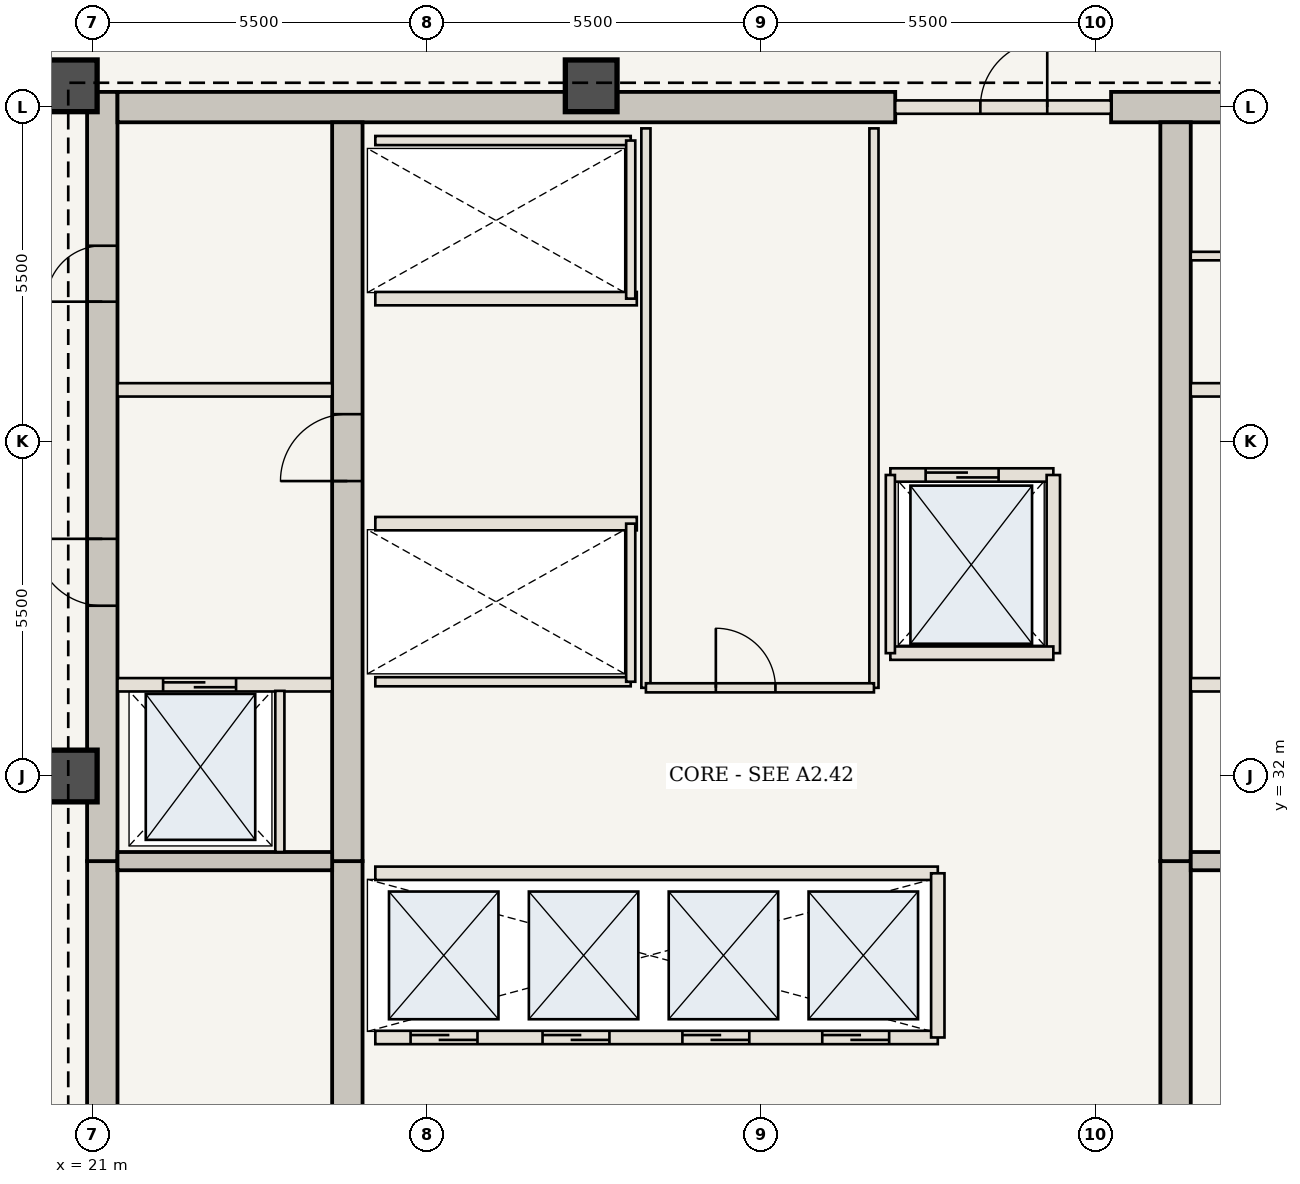
"""IFC4 building model, lengths in metres.
Left out: names, types, materials, properties, quantities, classifications, styles, units other than length and angle.
Written with IfcOpenShell. Run it as: python <this file> out.ifc"""

import sys

from ifc_helpers import new_model, si_unit, direction, frame, frame_2d, origin, origin_2d, place, context, subcontext, project, spatial, rectangle, extrude, element, fill, save


model = new_model("IFC4")
c1 = context("Model", 3, precision=1e-05, world=origin(), true_north=direction((0.0, 1.0)))
c2 = subcontext(c1, "Body", "Model", "MODEL_VIEW")
j1 = project(units=[si_unit("LENGTHUNIT", "METRE"), si_unit("PLANEANGLEUNIT", "RADIAN")], contexts=[c1])
p1 = place(None, origin())
s1 = spatial("IfcSite", under=j1, at=p1, CompositionType="ELEMENT")
p2 = place(p1, origin())
s2 = spatial("IfcBuilding", under=s1, at=p2, CompositionType="ELEMENT")
p3 = place(p2, frame((0.0, 0.0, 190.75)))
s3 = spatial("IfcBuildingStorey", under=s2, at=p3, CompositionType="ELEMENT", Elevation=190.75)
p4 = place(p3, frame((21.16, 20.7, 0.0), z_axis=(0.0, 0.0, 1.0), x_axis=(0.0, 1.0, 0.0)))
e1 = element("IfcWall", 1, at=p4, inside=s3, PredefinedType="SHEAR", context=c2, shape_type="SweptSolid", body=[
    extrude(rectangle(XDim=9.9, YDim=0.5, at=frame_2d((4.95, 0.0))), origin(), (0.0, 0.0, 1.0), 3.85),
])
p5 = place(p4, frame((1.05, 0.0, 0.0)))
e2 = element("IfcOpeningElement", 2, at=p5, cuts=e1, PredefinedType="OPENING", context=c2, shape_type="SweptSolid", body=[
    extrude(rectangle(XDim=1.15, YDim=2.15, at=frame_2d((0.575, 1.075))), frame((0.0, 0.26, 0.0), z_axis=(0.0, -1.0, 0.0), x_axis=(1.0, 0.0, 0.0)), (0.0, 0.0, 1.0), 0.52),
])
p6 = place(p3, frame((21.16, 30.6, 0.0), z_axis=(0.0, 0.0, 1.0), x_axis=(0.0, 1.0, 0.0)))
e3 = element("IfcWall", 3, at=p6, inside=s3, PredefinedType="SHEAR", context=c2, shape_type="SweptSolid", body=[
    extrude(rectangle(XDim=12.65, YDim=0.5, at=frame_2d((6.325, 0.0))), origin(), (0.0, 0.0, 1.0), 3.85),
])
p7 = place(p6, frame((4.2, 0.0, 0.0)))
e4 = element("IfcOpeningElement", 4, at=p7, cuts=e3, PredefinedType="OPENING", context=c2, shape_type="SweptSolid", body=[
    extrude(rectangle(XDim=1.1, YDim=2.15, at=frame_2d((0.55, 1.075))), frame((0.0, 0.26, 0.0), z_axis=(0.0, -1.0, 0.0), x_axis=(1.0, 0.0, 0.0)), (0.0, 0.0, 1.0), 0.52),
])
p8 = place(p6, frame((9.2, 0.0, 0.0)))
e5 = element("IfcOpeningElement", 5, at=p8, cuts=e3, PredefinedType="OPENING", context=c2, shape_type="SweptSolid", body=[
    extrude(rectangle(XDim=0.92, YDim=2.1, at=frame_2d((0.46, 1.05))), frame((0.0, 0.26, 0.0), z_axis=(0.0, -1.0, 0.0), x_axis=(1.0, 0.0, 0.0)), (0.0, 0.0, 1.0), 0.52),
])
p9 = place(p3, frame((21.41, 43.0, 0.0), z_axis=(0.0, 0.0, 1.0), x_axis=(1.0, 0.0, 0.0)))
e6 = element("IfcWall", 6, at=p9, inside=s3, PredefinedType="SHEAR", context=c2, shape_type="SweptSolid", body=[
    extrude(rectangle(XDim=12.79, YDim=0.5, at=frame_2d((6.395, 0.0))), origin(), (0.0, 0.0, 1.0), 3.85),
])
p10 = place(p3, frame((37.75, 43.0, 0.0), z_axis=(0.0, 0.0, 1.0), x_axis=(1.0, 0.0, 0.0)))
e7 = element("IfcWall", 7, at=p10, inside=s3, PredefinedType="SHEAR", context=c2, shape_type="SweptSolid", body=[
    extrude(rectangle(XDim=4.84, YDim=0.5, at=frame_2d((2.42, 0.0))), origin(), (0.0, 0.0, 1.0), 3.85),
])
p11 = place(p3, frame((25.19, 21.2, 0.0), z_axis=(0.0, 0.0, 1.0), x_axis=(0.0, 1.0, 0.0)))
e8 = element("IfcWall", 8, at=p11, inside=s3, PredefinedType="SHEAR", context=c2, shape_type="SweptSolid", body=[
    extrude(rectangle(XDim=9.4, YDim=0.5, at=frame_2d((4.7, 0.0))), origin(), (0.0, 0.0, 1.0), 3.85),
])
p12 = place(p3, frame((25.19, 30.6, 0.0), z_axis=(0.0, 0.0, 1.0), x_axis=(0.0, 1.0, 0.0)))
e9 = element("IfcWall", 9, at=p12, inside=s3, PredefinedType="SHEAR", context=c2, shape_type="SweptSolid", body=[
    extrude(rectangle(XDim=12.15, YDim=0.5, at=frame_2d((6.075, 0.0))), origin(), (0.0, 0.0, 1.0), 3.85),
])
p13 = place(p12, frame((6.25, 0.0, 0.0)))
e10 = element("IfcOpeningElement", 10, at=p13, cuts=e9, PredefinedType="OPENING", context=c2, shape_type="SweptSolid", body=[
    extrude(rectangle(XDim=1.1, YDim=2.15, at=frame_2d((0.55, 1.075))), frame((0.0, 0.26, 0.0), z_axis=(0.0, -1.0, 0.0), x_axis=(1.0, 0.0, 0.0)), (0.0, 0.0, 1.0), 0.52),
])
p14 = place(p3, frame((38.81, 21.2, 0.0), z_axis=(0.0, 0.0, 1.0), x_axis=(0.0, 1.0, 0.0)))
e11 = element("IfcWall", 11, at=p14, inside=s3, PredefinedType="SHEAR", context=c2, shape_type="SweptSolid", body=[
    extrude(rectangle(XDim=9.4, YDim=0.5, at=frame_2d((4.7, 0.0))), origin(), (0.0, 0.0, 1.0), 3.85),
])
p15 = place(p3, frame((38.81, 30.6, 0.0), z_axis=(0.0, 0.0, 1.0), x_axis=(0.0, 1.0, 0.0)))
e12 = element("IfcWall", 12, at=p15, inside=s3, PredefinedType="SHEAR", context=c2, shape_type="SweptSolid", body=[
    extrude(rectangle(XDim=12.15, YDim=0.5, at=frame_2d((6.075, 0.0))), origin(), (0.0, 0.0, 1.0), 3.85),
])
for number, where, z_axis, x_axis in (
    (13, (29.2, 43.35, 0.0), (0.0, 0.0, 1.0), (1.0, 0.0, 0.0)),
    (14, (20.65, 43.35, 0.0), (0.0, 0.0, 1.0), (1.0, 0.0, 0.0)),
    (15, (20.65, 32.0, 0.0), (0.0, 0.0, 1.0), (1.0, 0.0, 0.0)),
):
    element("IfcColumn", number, at=place(p3, frame(where, z_axis=z_axis, x_axis=x_axis)), inside=s3, PredefinedType="COLUMN", context=c2, shape_type="SweptSolid", body=[
        extrude(rectangle(XDim=0.85, YDim=0.85, at=origin_2d()), origin(), (0.0, 0.0, 1.0), 3.85),
    ])
for number, where, z_axis, x_axis in (
    (16, (21.41, 30.6, 0.0), (0.0, 0.0, 1.0), (1.0, 0.0, 0.0)),
    (17, (39.06, 30.6, 0.0), (0.0, 0.0, 1.0), (1.0, 0.0, 0.0)),
):
    element("IfcWall", number, at=place(p3, frame(where, z_axis=z_axis, x_axis=x_axis)), inside=s3, PredefinedType="SHEAR", context=c2, shape_type="SweptSolid", body=[
        extrude(rectangle(XDim=3.53, YDim=0.3, at=frame_2d((1.765, 0.0))), origin(), (0.0, 0.0, 1.0), 3.685),
    ])
p16 = place(p3, frame((21.41, 33.5, 0.0), z_axis=(0.0, 0.0, 1.0), x_axis=(1.0, 0.0, 0.0)))
e18 = element("IfcWall", 18, at=p16, inside=s3, PredefinedType="STANDARD", context=c2, shape_type="SweptSolid", body=[
    extrude(rectangle(XDim=3.53, YDim=0.22, at=frame_2d((1.765, 0.0))), origin(), (0.0, 0.0, 1.0), 3.685),
])
p17 = place(p16, frame((0.75, 0.0, 0.0)))
e19 = element("IfcOpeningElement", 19, at=p17, cuts=e18, PredefinedType="OPENING", context=c2, shape_type="SweptSolid", body=[
    extrude(rectangle(XDim=1.2, YDim=2.2, at=frame_2d((0.6, 1.1))), frame((0.0, 0.12, 0.0), z_axis=(0.0, -1.0, 0.0), x_axis=(1.0, 0.0, 0.0)), (0.0, 0.0, 1.0), 0.24),
])
p18 = place(p3, frame((24.08, 30.75, 0.0), z_axis=(0.0, 0.0, 1.0), x_axis=(0.0, 1.0, 0.0)))
e20 = element("IfcWall", 20, at=p18, inside=s3, PredefinedType="STANDARD", context=c2, shape_type="SweptSolid", body=[
    extrude(rectangle(XDim=2.65, YDim=0.15, at=frame_2d((1.325, 0.0))), origin(), (0.0, 0.0, 1.0), 3.685),
])
p19 = place(p3, frame((39.06, 33.5, 0.0), z_axis=(0.0, 0.0, 1.0), x_axis=(1.0, 0.0, 0.0)))
e21 = element("IfcWall", 21, at=p19, inside=s3, PredefinedType="STANDARD", context=c2, shape_type="SweptSolid", body=[
    extrude(rectangle(XDim=3.53, YDim=0.22, at=frame_2d((1.765, 0.0))), origin(), (0.0, 0.0, 1.0), 3.685),
])
p20 = place(p19, frame((1.55, 0.0, 0.0)))
e22 = element("IfcOpeningElement", 22, at=p20, cuts=e21, PredefinedType="OPENING", context=c2, shape_type="SweptSolid", body=[
    extrude(rectangle(XDim=1.2, YDim=2.2, at=frame_2d((0.6, 1.1))), frame((0.0, 0.12, 0.0), z_axis=(0.0, -1.0, 0.0), x_axis=(1.0, 0.0, 0.0)), (0.0, 0.0, 1.0), 0.24),
])
for number, where, z_axis, x_axis in (
    (23, (21.41, 38.35, 0.0), (0.0, 0.0, 1.0), (1.0, 0.0, 0.0)),
    (24, (39.06, 38.35, 0.0), (0.0, 0.0, 1.0), (1.0, 0.0, 0.0)),
):
    element("IfcWall", number, at=place(p3, frame(where, z_axis=z_axis, x_axis=x_axis)), inside=s3, PredefinedType="STANDARD", context=c2, shape_type="SweptSolid", body=[
        extrude(rectangle(XDim=3.53, YDim=0.22, at=frame_2d((1.765, 0.0))), origin(), (0.0, 0.0, 1.0), 3.685),
    ])
p21 = place(p3, frame((39.06, 40.55, 0.0), z_axis=(0.0, 0.0, 1.0), x_axis=(1.0, 0.0, 0.0)))
e25 = element("IfcWall", 25, at=p21, inside=s3, PredefinedType="STANDARD", context=c2, shape_type="SweptSolid", body=[
    extrude(rectangle(XDim=3.53, YDim=0.14, at=frame_2d((1.765, 0.0))), origin(), (0.0, 0.0, 1.0), 3.685),
])
p22 = place(p3, frame((25.65, 27.7, 0.0), z_axis=(0.0, 0.0, 1.0), x_axis=(1.0, 0.0, 0.0)))
e26 = element("IfcWall", 26, at=p22, inside=s3, PredefinedType="STANDARD", context=c2, shape_type="SweptSolid", body=[
    extrude(rectangle(XDim=9.25, YDim=0.22, at=frame_2d((4.625, 0.0))), origin(), (0.0, 0.0, 1.0), 3.685),
])
p23 = place(p22, frame((0.58, 0.0, 0.0)))
e27 = element("IfcOpeningElement", 27, at=p23, cuts=e26, PredefinedType="OPENING", context=c2, shape_type="SweptSolid", body=[
    extrude(rectangle(XDim=1.1, YDim=2.15, at=frame_2d((0.55, 1.075))), frame((0.0, 0.12, 0.0), z_axis=(0.0, -1.0, 0.0), x_axis=(1.0, 0.0, 0.0)), (0.0, 0.0, 1.0), 0.24),
])
p24 = place(p22, frame((2.75, 0.0, 0.0)))
e28 = element("IfcOpeningElement", 28, at=p24, cuts=e26, PredefinedType="OPENING", context=c2, shape_type="SweptSolid", body=[
    extrude(rectangle(XDim=1.1, YDim=2.15, at=frame_2d((0.55, 1.075))), frame((0.0, 0.12, 0.0), z_axis=(0.0, -1.0, 0.0), x_axis=(1.0, 0.0, 0.0)), (0.0, 0.0, 1.0), 0.24),
])
p25 = place(p22, frame((5.05, 0.0, 0.0)))
e29 = element("IfcOpeningElement", 29, at=p25, cuts=e26, PredefinedType="OPENING", context=c2, shape_type="SweptSolid", body=[
    extrude(rectangle(XDim=1.1, YDim=2.15, at=frame_2d((0.55, 1.075))), frame((0.0, 0.12, 0.0), z_axis=(0.0, -1.0, 0.0), x_axis=(1.0, 0.0, 0.0)), (0.0, 0.0, 1.0), 0.24),
])
p26 = place(p22, frame((7.35, 0.0, 0.0)))
e30 = element("IfcOpeningElement", 30, at=p26, cuts=e26, PredefinedType="OPENING", context=c2, shape_type="SweptSolid", body=[
    extrude(rectangle(XDim=1.1, YDim=2.15, at=frame_2d((0.55, 1.075))), frame((0.0, 0.12, 0.0), z_axis=(0.0, -1.0, 0.0), x_axis=(1.0, 0.0, 0.0)), (0.0, 0.0, 1.0), 0.24),
])
p27 = place(p3, frame((25.65, 30.4, 0.0), z_axis=(0.0, 0.0, 1.0), x_axis=(1.0, 0.0, 0.0)))
e31 = element("IfcWall", 31, at=p27, inside=s3, PredefinedType="STANDARD", context=c2, shape_type="SweptSolid", body=[
    extrude(rectangle(XDim=9.25, YDim=0.22, at=frame_2d((4.625, 0.0))), origin(), (0.0, 0.0, 1.0), 3.685),
])
p28 = place(p3, frame((34.9, 27.7, 0.0), z_axis=(0.0, 0.0, 1.0), x_axis=(0.0, 1.0, 0.0)))
e32 = element("IfcWall", 32, at=p28, inside=s3, PredefinedType="STANDARD", context=c2, shape_type="SweptSolid", body=[
    extrude(rectangle(XDim=2.7, YDim=0.22, at=frame_2d((1.35, 0.0))), origin(), (0.0, 0.0, 1.0), 3.685),
])
p29 = place(p3, frame((25.65, 36.15, 0.0), z_axis=(0.0, 0.0, 1.0), x_axis=(1.0, 0.0, 0.0)))
e33 = element("IfcWall", 33, at=p29, inside=s3, PredefinedType="STANDARD", context=c2, shape_type="SweptSolid", body=[
    extrude(rectangle(XDim=4.3, YDim=0.22, at=frame_2d((2.15, 0.0))), origin(), (0.0, 0.0, 1.0), 3.685),
])
p30 = place(p3, frame((25.65, 33.55, 0.0), z_axis=(0.0, 0.0, 1.0), x_axis=(1.0, 0.0, 0.0)))
e34 = element("IfcWall", 34, at=p30, inside=s3, PredefinedType="STANDARD", context=c2, shape_type="SweptSolid", body=[
    extrude(rectangle(XDim=4.2, YDim=0.15, at=frame_2d((2.1, 0.0))), origin(), (0.0, 0.0, 1.0), 3.685),
])
p31 = place(p3, frame((29.85, 33.55, 0.0), z_axis=(0.0, 0.0, 1.0), x_axis=(0.0, 1.0, 0.0)))
e35 = element("IfcWall", 35, at=p31, inside=s3, PredefinedType="STANDARD", context=c2, shape_type="SweptSolid", body=[
    extrude(rectangle(XDim=2.6, YDim=0.15, at=frame_2d((1.3, 0.0))), origin(), (0.0, 0.0, 1.0), 3.685),
])
p32 = place(p3, frame((25.65, 39.85, 0.0), z_axis=(0.0, 0.0, 1.0), x_axis=(1.0, 0.0, 0.0)))
e36 = element("IfcWall", 36, at=p32, inside=s3, PredefinedType="STANDARD", context=c2, shape_type="SweptSolid", body=[
    extrude(rectangle(XDim=4.3, YDim=0.22, at=frame_2d((2.15, 0.0))), origin(), (0.0, 0.0, 1.0), 3.685),
])
p33 = place(p3, frame((25.65, 42.45, 0.0), z_axis=(0.0, 0.0, 1.0), x_axis=(1.0, 0.0, 0.0)))
e37 = element("IfcWall", 37, at=p33, inside=s3, PredefinedType="STANDARD", context=c2, shape_type="SweptSolid", body=[
    extrude(rectangle(XDim=4.2, YDim=0.15, at=frame_2d((2.1, 0.0))), origin(), (0.0, 0.0, 1.0), 3.685),
])
p34 = place(p3, frame((29.85, 39.85, 0.0), z_axis=(0.0, 0.0, 1.0), x_axis=(0.0, 1.0, 0.0)))
e38 = element("IfcWall", 38, at=p34, inside=s3, PredefinedType="STANDARD", context=c2, shape_type="SweptSolid", body=[
    extrude(rectangle(XDim=2.6, YDim=0.15, at=frame_2d((1.3, 0.0))), origin(), (0.0, 0.0, 1.0), 3.685),
])
for number, where, z_axis, x_axis in (
    (39, (30.1, 33.45, 0.0), (0.0, 0.0, 1.0), (0.0, 1.0, 0.0)),
    (40, (33.85, 33.45, 0.0), (0.0, 0.0, 1.0), (0.0, 1.0, 0.0)),
):
    element("IfcWall", number, at=place(p3, frame(where, z_axis=z_axis, x_axis=x_axis)), inside=s3, PredefinedType="STANDARD", context=c2, shape_type="SweptSolid", body=[
        extrude(rectangle(XDim=9.2, YDim=0.15, at=frame_2d((4.6, 0.0))), origin(), (0.0, 0.0, 1.0), 3.685),
    ])
p35 = place(p3, frame((30.1, 33.45, 0.0), z_axis=(0.0, 0.0, 1.0), x_axis=(1.0, 0.0, 0.0)))
e41 = element("IfcWall", 41, at=p35, inside=s3, PredefinedType="STANDARD", context=c2, shape_type="SweptSolid", body=[
    extrude(rectangle(XDim=3.75, YDim=0.15, at=frame_2d((1.875, 0.0))), origin(), (0.0, 0.0, 1.0), 3.685),
])
p36 = place(p35, frame((1.15, 0.0, 0.0)))
e42 = element("IfcOpeningElement", 42, at=p36, cuts=e41, PredefinedType="OPENING", context=c2, shape_type="SweptSolid", body=[
    extrude(rectangle(XDim=0.98, YDim=2.2, at=frame_2d((0.49, 1.1))), frame((0.0, 0.085, 0.0), z_axis=(0.0, -1.0, 0.0), x_axis=(1.0, 0.0, 0.0)), (0.0, 0.0, 1.0), 0.17),
])
p37 = place(p3, frame((34.2, 43.0, 0.0), z_axis=(0.0, 0.0, 1.0), x_axis=(1.0, 0.0, 0.0)))
e43 = element("IfcWall", 43, at=p37, inside=s3, PredefinedType="STANDARD", context=c2, shape_type="SweptSolid", body=[
    extrude(rectangle(XDim=3.55, YDim=0.22, at=frame_2d((1.775, 0.0))), origin(), (0.0, 0.0, 1.0), 3.685),
])
p38 = place(p37, frame((1.4, 0.0, 0.0)))
e44 = element("IfcOpeningElement", 44, at=p38, cuts=e43, PredefinedType="OPENING", context=c2, shape_type="SweptSolid", body=[
    extrude(rectangle(XDim=1.1, YDim=2.15, at=frame_2d((0.55, 1.075))), frame((0.0, 0.12, 0.0), z_axis=(0.0, -1.0, 0.0), x_axis=(1.0, 0.0, 0.0)), (0.0, 0.0, 1.0), 0.24),
])
p39 = place(p3, frame((34.12, 36.95, 0.0), z_axis=(0.0, 0.0, 1.0), x_axis=(1.0, 0.0, 0.0)))
e45 = element("IfcWall", 45, at=p39, inside=s3, PredefinedType="STANDARD", context=c2, shape_type="SweptSolid", body=[
    extrude(rectangle(XDim=2.68, YDim=0.22, at=frame_2d((1.34, 0.0))), origin(), (0.0, 0.0, 1.0), 3.685),
])
p40 = place(p39, frame((0.58, 0.0, 0.0)))
e46 = element("IfcOpeningElement", 46, at=p40, cuts=e45, PredefinedType="OPENING", context=c2, shape_type="SweptSolid", body=[
    extrude(rectangle(XDim=1.2, YDim=2.2, at=frame_2d((0.6, 1.1))), frame((0.0, 0.12, 0.0), z_axis=(0.0, -1.0, 0.0), x_axis=(1.0, 0.0, 0.0)), (0.0, 0.0, 1.0), 0.24),
])
p41 = place(p3, frame((36.8, 34.02, 0.0), z_axis=(0.0, 0.0, 1.0), x_axis=(0.0, 1.0, 0.0)))
e47 = element("IfcWall", 47, at=p41, inside=s3, PredefinedType="STANDARD", context=c2, shape_type="SweptSolid", body=[
    extrude(rectangle(XDim=2.93, YDim=0.22, at=frame_2d((1.465, 0.0))), origin(), (0.0, 0.0, 1.0), 3.685),
])
p42 = place(p3, frame((34.12, 34.02, 0.0), z_axis=(0.0, 0.0, 1.0), x_axis=(1.0, 0.0, 0.0)))
e48 = element("IfcWall", 48, at=p42, inside=s3, PredefinedType="STANDARD", context=c2, shape_type="SweptSolid", body=[
    extrude(rectangle(XDim=2.68, YDim=0.22, at=frame_2d((1.34, 0.0))), origin(), (0.0, 0.0, 1.0), 3.685),
])
p43 = place(p3, frame((34.12, 34.02, 0.0), z_axis=(0.0, 0.0, 1.0), x_axis=(0.0, 1.0, 0.0)))
e49 = element("IfcWall", 49, at=p43, inside=s3, PredefinedType="STANDARD", context=c2, shape_type="SweptSolid", body=[
    extrude(rectangle(XDim=2.93, YDim=0.15, at=frame_2d((1.465, 0.0))), origin(), (0.0, 0.0, 1.0), 3.685),
])
p44 = place(p7, origin())
e50 = element("IfcDoor", 50, at=p44, inside=s3, OperationType="SINGLE_SWING_RIGHT", PredefinedType="DOOR", context=c2, shape_type="SweptSolid", body=[
    extrude(rectangle(XDim=1.1, YDim=2.15, at=frame_2d((0.55, 1.075))), frame((0.0, 0.025, 0.0), z_axis=(0.0, -1.0, 0.0), x_axis=(1.0, 0.0, 0.0)), (0.0, 0.0, 1.0), 0.05),
])
fill(e4, e50)
p45 = place(p13, origin())
e51 = element("IfcDoor", 51, at=p45, inside=s3, OperationType="SINGLE_SWING_LEFT", PredefinedType="DOOR", context=c2, shape_type="SweptSolid", body=[
    extrude(rectangle(XDim=1.1, YDim=2.15, at=frame_2d((0.55, 1.075))), frame((0.0, 0.025, 0.0), z_axis=(0.0, -1.0, 0.0), x_axis=(1.0, 0.0, 0.0)), (0.0, 0.0, 1.0), 0.05),
])
fill(e10, e51)
p46 = place(p8, origin())
e52 = element("IfcDoor", 52, at=p46, inside=s3, OperationType="SINGLE_SWING_LEFT", PredefinedType="DOOR", context=c2, shape_type="SweptSolid", body=[
    extrude(rectangle(XDim=0.92, YDim=2.1, at=frame_2d((0.46, 1.05))), frame((0.0, 0.025, 0.0), z_axis=(0.0, -1.0, 0.0), x_axis=(1.0, 0.0, 0.0)), (0.0, 0.0, 1.0), 0.05),
])
fill(e5, e52)
p47 = place(p17, origin())
e53 = element("IfcDoor", 53, at=p47, inside=s3, OperationType="DOUBLE_DOOR_SLIDING", PredefinedType="DOOR", context=c2, shape_type="SweptSolid", body=[
    extrude(rectangle(XDim=1.2, YDim=2.2, at=frame_2d((0.6, 1.1))), frame((0.0, 0.025, 0.0), z_axis=(0.0, -1.0, 0.0), x_axis=(1.0, 0.0, 0.0)), (0.0, 0.0, 1.0), 0.05),
])
fill(e19, e53)
p48 = place(p23, origin())
e54 = element("IfcDoor", 54, at=p48, inside=s3, OperationType="DOUBLE_DOOR_SLIDING", PredefinedType="DOOR", context=c2, shape_type="SweptSolid", body=[
    extrude(rectangle(XDim=1.1, YDim=2.15, at=frame_2d((0.55, 1.075))), frame((0.0, 0.025, 0.0), z_axis=(0.0, -1.0, 0.0), x_axis=(1.0, 0.0, 0.0)), (0.0, 0.0, 1.0), 0.05),
])
fill(e27, e54)
p49 = place(p24, origin())
e55 = element("IfcDoor", 55, at=p49, inside=s3, OperationType="DOUBLE_DOOR_SLIDING", PredefinedType="DOOR", context=c2, shape_type="SweptSolid", body=[
    extrude(rectangle(XDim=1.1, YDim=2.15, at=frame_2d((0.55, 1.075))), frame((0.0, 0.025, 0.0), z_axis=(0.0, -1.0, 0.0), x_axis=(1.0, 0.0, 0.0)), (0.0, 0.0, 1.0), 0.05),
])
fill(e28, e55)
p50 = place(p25, origin())
e56 = element("IfcDoor", 56, at=p50, inside=s3, OperationType="DOUBLE_DOOR_SLIDING", PredefinedType="DOOR", context=c2, shape_type="SweptSolid", body=[
    extrude(rectangle(XDim=1.1, YDim=2.15, at=frame_2d((0.55, 1.075))), frame((0.0, 0.025, 0.0), z_axis=(0.0, -1.0, 0.0), x_axis=(1.0, 0.0, 0.0)), (0.0, 0.0, 1.0), 0.05),
])
fill(e29, e56)
p51 = place(p26, origin())
e57 = element("IfcDoor", 57, at=p51, inside=s3, OperationType="DOUBLE_DOOR_SLIDING", PredefinedType="DOOR", context=c2, shape_type="SweptSolid", body=[
    extrude(rectangle(XDim=1.1, YDim=2.15, at=frame_2d((0.55, 1.075))), frame((0.0, 0.025, 0.0), z_axis=(0.0, -1.0, 0.0), x_axis=(1.0, 0.0, 0.0)), (0.0, 0.0, 1.0), 0.05),
])
fill(e30, e57)
p52 = place(p36, origin())
e58 = element("IfcDoor", 58, at=p52, inside=s3, OperationType="SINGLE_SWING_LEFT", PredefinedType="DOOR", context=c2, shape_type="SweptSolid", body=[
    extrude(rectangle(XDim=0.98, YDim=2.2, at=frame_2d((0.49, 1.1))), frame((0.0, 0.025, 0.0), z_axis=(0.0, -1.0, 0.0), x_axis=(1.0, 0.0, 0.0)), (0.0, 0.0, 1.0), 0.05),
])
fill(e42, e58)
p53 = place(p38, origin())
e59 = element("IfcDoor", 59, at=p53, inside=s3, OperationType="SINGLE_SWING_RIGHT", PredefinedType="DOOR", context=c2, shape_type="SweptSolid", body=[
    extrude(rectangle(XDim=1.1, YDim=2.15, at=frame_2d((0.55, 1.075))), frame((0.0, 0.025, 0.0), z_axis=(0.0, -1.0, 0.0), x_axis=(1.0, 0.0, 0.0)), (0.0, 0.0, 1.0), 0.05),
])
fill(e44, e59)
p54 = place(p40, origin())
e60 = element("IfcDoor", 60, at=p54, inside=s3, OperationType="DOUBLE_DOOR_SLIDING", PredefinedType="DOOR", context=c2, shape_type="SweptSolid", body=[
    extrude(rectangle(XDim=1.2, YDim=2.2, at=frame_2d((0.6, 1.1))), frame((0.0, 0.025, 0.0), z_axis=(0.0, -1.0, 0.0), x_axis=(1.0, 0.0, 0.0)), (0.0, 0.0, 1.0), 0.05),
])
fill(e46, e60)
save(model, sys.argv[1])
